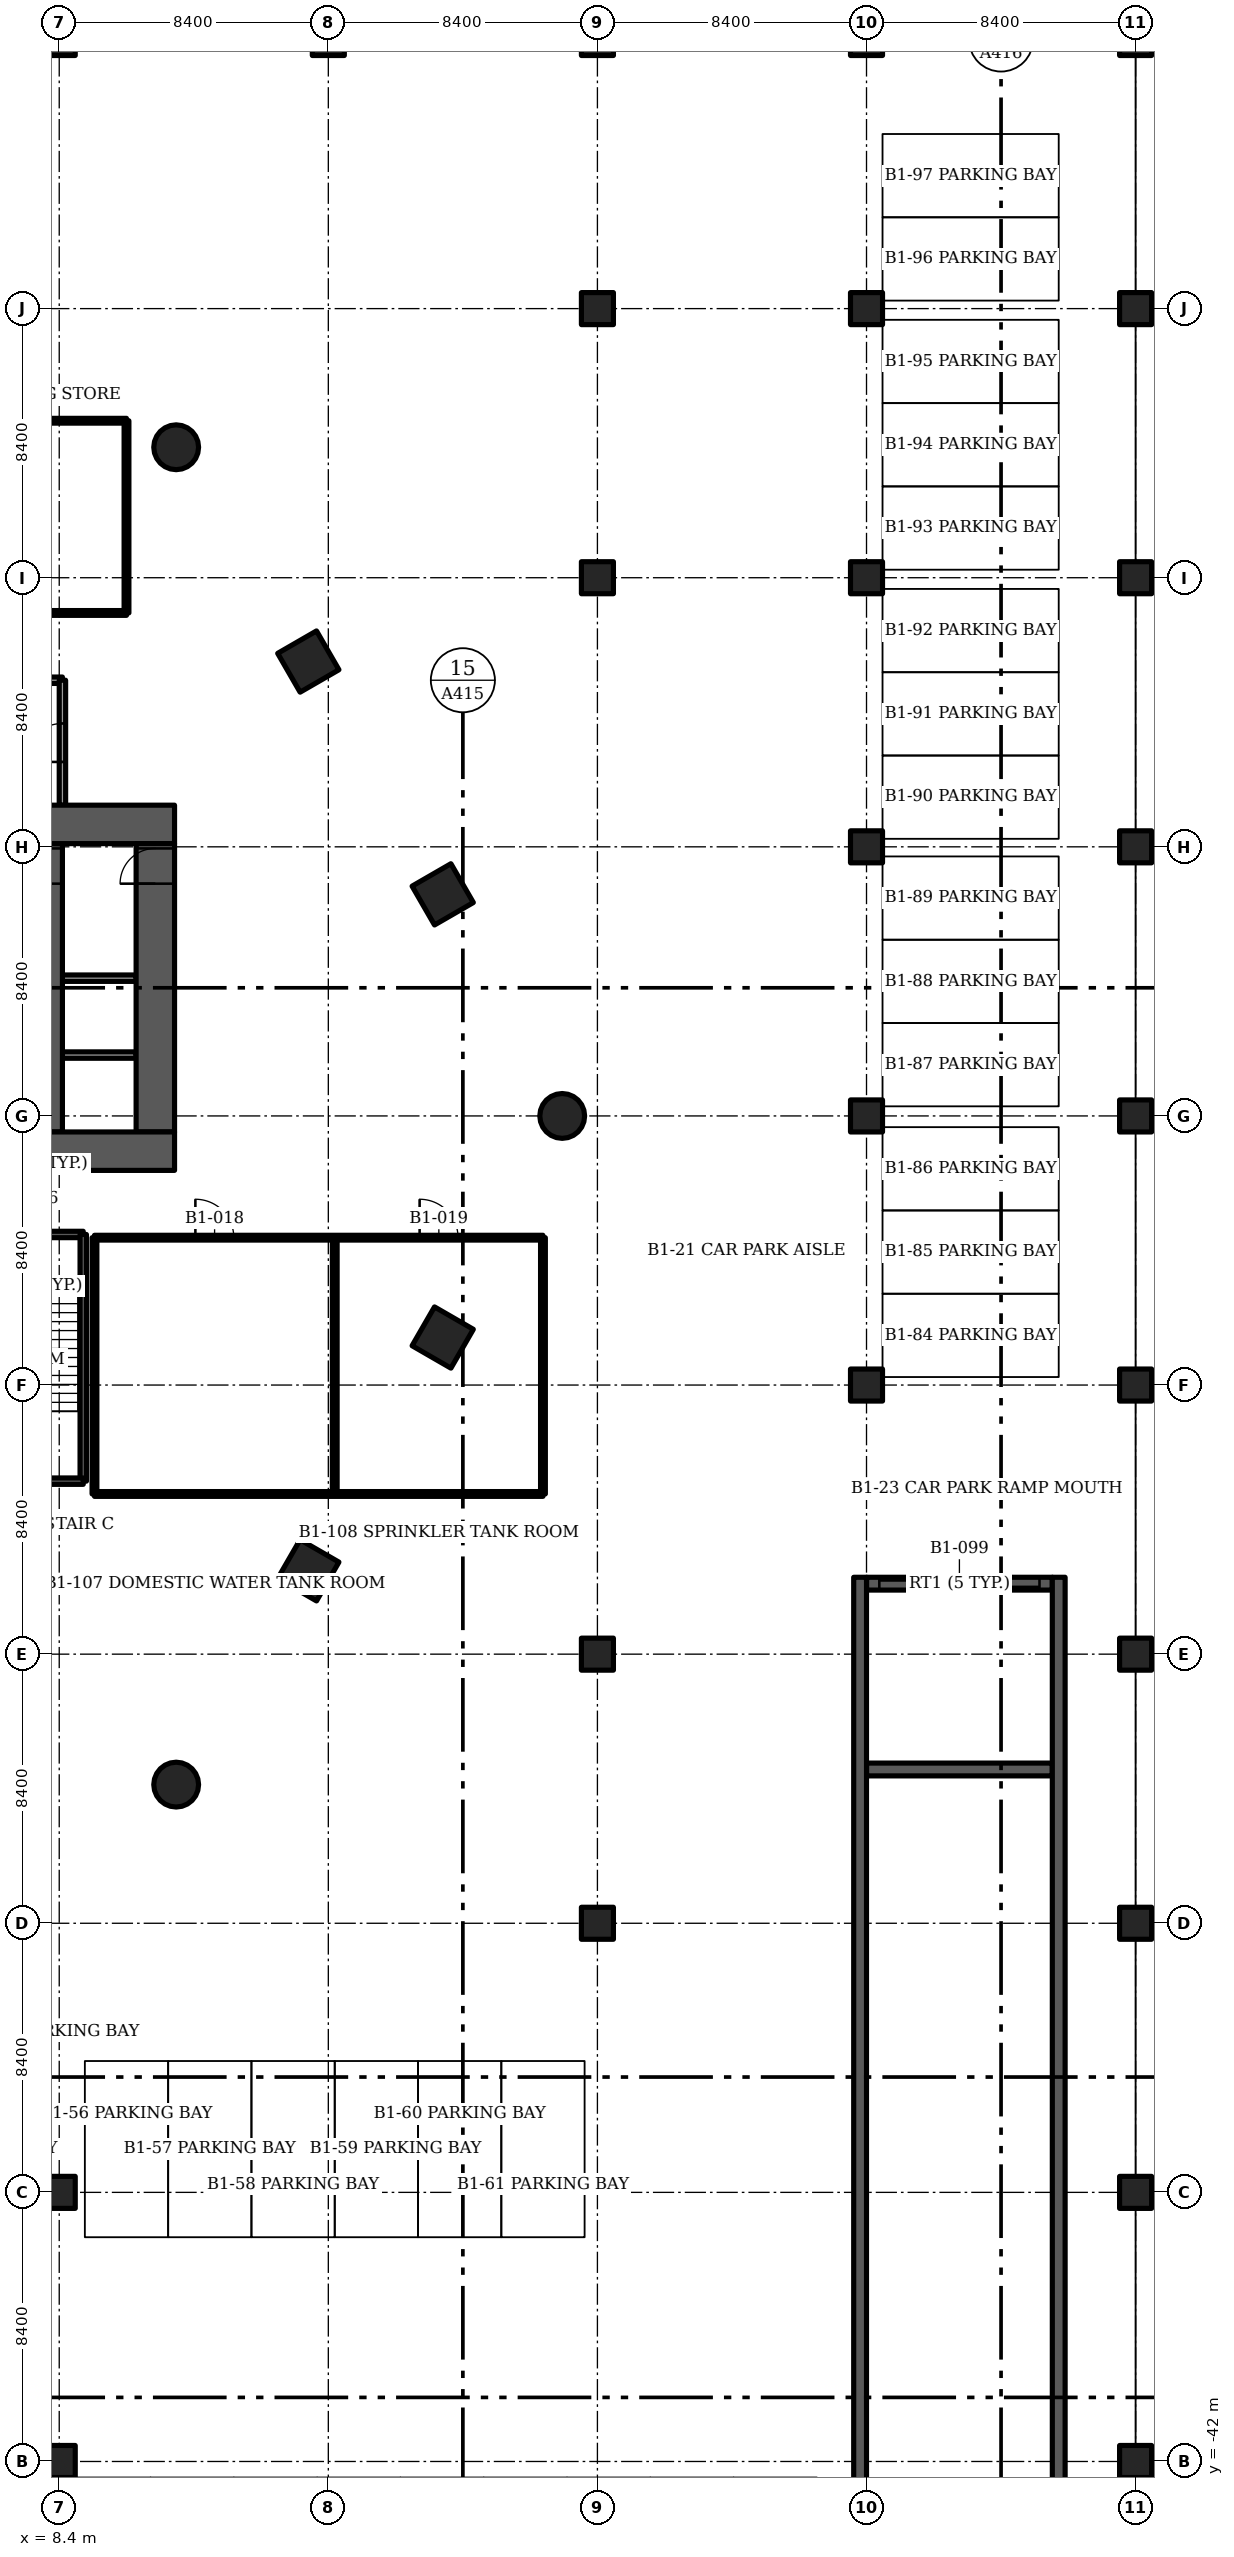
"""IFC4 building model, lengths in metres.
Left out: names, types, materials, properties, quantities, classifications, styles, units other than length and angle.
Written with IfcOpenShell. Run it as: python <this file> out.ifc"""

import sys

from ifc_helpers import new_model, si_unit, direction, frame, frame_2d, origin, origin_2d, place, context, subcontext, project, spatial, rectangle, circle, extrude, element, fill, save


model = new_model("IFC4")
c1 = context("Model", 3, precision=1e-05, world=origin(), true_north=direction((0.0, 1.0)))
c2 = subcontext(c1, "Body", "Model", "MODEL_VIEW")
j1 = project(units=[si_unit("LENGTHUNIT", "METRE"), si_unit("PLANEANGLEUNIT", "RADIAN")], contexts=[c1])
p1 = place(None, origin())
s1 = spatial("IfcSite", under=j1, at=p1, CompositionType="ELEMENT")
p2 = place(p1, origin())
s2 = spatial("IfcBuilding", under=s1, at=p2, CompositionType="ELEMENT")
p3 = place(p2, frame((0.0, 0.0, -5.0)))
s3 = spatial("IfcBuildingStorey", under=s2, at=p3, CompositionType="ELEMENT", Elevation=-5.0)
for number, where, z_axis, x_axis in (
    (1, (8.4, -42.0, -0.3), (0.0, 0.0, 1.0), (1.0, 0.0, 0.0)),
    (2, (8.4, -33.6, -0.3), (0.0, 0.0, 1.0), (1.0, 0.0, 0.0)),
    (3, (8.4, 33.6, -0.3), (0.0, 0.0, 1.0), (1.0, 0.0, 0.0)),
    (4, (16.8, 33.6, -0.3), (0.0, 0.0, 1.0), (1.0, 0.0, 0.0)),
    (5, (25.2, -25.2, -0.3), (0.0, 0.0, 1.0), (1.0, 0.0, 0.0)),
    (6, (25.2, -16.8, -0.3), (0.0, 0.0, 1.0), (1.0, 0.0, 0.0)),
    (7, (25.2, 16.8, -0.3), (0.0, 0.0, 1.0), (1.0, 0.0, 0.0)),
    (8, (25.2, 25.2, -0.3), (0.0, 0.0, 1.0), (1.0, 0.0, 0.0)),
    (9, (25.2, 33.6, -0.3), (0.0, 0.0, 1.0), (1.0, 0.0, 0.0)),
    (10, (33.6, -8.4, -0.3), (0.0, 0.0, 1.0), (1.0, 0.0, 0.0)),
    (11, (33.6, 0.0, -0.3), (0.0, 0.0, 1.0), (1.0, 0.0, 0.0)),
    (12, (33.6, 8.4, -0.3), (0.0, 0.0, 1.0), (1.0, 0.0, 0.0)),
    (13, (33.6, 16.8, -0.3), (0.0, 0.0, 1.0), (1.0, 0.0, 0.0)),
    (14, (33.6, 25.2, -0.3), (0.0, 0.0, 1.0), (1.0, 0.0, 0.0)),
    (15, (33.6, 33.6, -0.3), (0.0, 0.0, 1.0), (1.0, 0.0, 0.0)),
    (16, (42.0, -42.0, -0.3), (0.0, 0.0, 1.0), (1.0, 0.0, 0.0)),
    (17, (42.0, -33.6, -0.3), (0.0, 0.0, 1.0), (1.0, 0.0, 0.0)),
    (18, (42.0, -25.2, -0.3), (0.0, 0.0, 1.0), (1.0, 0.0, 0.0)),
    (19, (42.0, -16.8, -0.3), (0.0, 0.0, 1.0), (1.0, 0.0, 0.0)),
    (20, (42.0, -8.4, -0.3), (0.0, 0.0, 1.0), (1.0, 0.0, 0.0)),
    (21, (42.0, 0.0, -0.3), (0.0, 0.0, 1.0), (1.0, 0.0, 0.0)),
    (22, (42.0, 8.4, -0.3), (0.0, 0.0, 1.0), (1.0, 0.0, 0.0)),
    (23, (42.0, 16.8, -0.3), (0.0, 0.0, 1.0), (1.0, 0.0, 0.0)),
    (24, (42.0, 25.2, -0.3), (0.0, 0.0, 1.0), (1.0, 0.0, 0.0)),
    (25, (42.0, 33.6, -0.3), (0.0, 0.0, 1.0), (1.0, 0.0, 0.0)),
):
    element("IfcColumn", number, at=place(p3, frame(where, z_axis=z_axis, x_axis=x_axis)), inside=s3, PredefinedType="COLUMN", context=c2, shape_type="SweptSolid", body=[
        extrude(rectangle(XDim=1.0, YDim=1.0, at=origin_2d()), origin(), (0.0, 0.0, 1.0), 4.95),
    ])
for number, where, z_axis, x_axis in (
    (26, (12.051, -20.872, 0.0), (0.0, 0.0, 1.0), (1.0, 0.0, 0.0)),
    (27, (24.101, 0.0, 0.0), (0.0, 0.0, 1.0), (1.0, 0.0, 0.0)),
    (28, (12.051, 20.872, 0.0), (0.0, 0.0, 1.0), (1.0, 0.0, 0.0)),
):
    element("IfcColumn", number, at=place(p3, frame(where, z_axis=z_axis, x_axis=x_axis)), inside=s3, PredefinedType="COLUMN", context=c2, shape_type="SweptSolid", body=[
        extrude(circle(Radius=0.7, at=origin_2d()), origin(), (0.0, 0.0, 1.0), 4.65),
    ])
for number, where, z_axis, x_axis in (
    (29, (16.175, -14.183, 0.0), (0.0, 0.0, 1.0), (-0.5, -0.866, 0.0)),
    (30, (20.371, -6.917, 0.0), (0.0, 0.0, 1.0), (-0.5, -0.866, 0.0)),
    (31, (20.371, 6.917, 0.0), (0.0, 0.0, 1.0), (0.5, -0.866, 0.0)),
    (32, (16.175, 14.183, 0.0), (0.0, 0.0, 1.0), (0.5, -0.866, 0.0)),
):
    element("IfcColumn", number, at=place(p3, frame(where, z_axis=z_axis, x_axis=x_axis)), inside=s3, PredefinedType="COLUMN", context=c2, shape_type="SweptSolid", body=[
        extrude(rectangle(XDim=1.4, YDim=1.4, at=origin_2d()), origin(), (0.0, 0.0, 1.0), 4.65),
    ])
p4 = place(p3, frame((-12.0, -1.1, 0.0), z_axis=(0.0, 0.0, 1.0), x_axis=(1.0, 0.0, 0.0)))
e33 = element("IfcWall", 33, at=p4, inside=s3, PredefinedType="SHEAR", context=c2, shape_type="SweptSolid", body=[
    extrude(rectangle(XDim=24.0, YDim=1.2, at=frame_2d((12.0, 0.0))), origin(), (0.0, 0.0, 1.0), 4.65),
])
p5 = place(p4, frame((11.2, 0.0, 0.0)))
e34 = element("IfcOpeningElement", 34, at=p5, cuts=e33, PredefinedType="OPENING", context=c2, shape_type="SweptSolid", body=[
    extrude(rectangle(XDim=1.6, YDim=2.1, at=frame_2d((0.8, 1.05))), frame((0.0, 0.6, 0.0), z_axis=(0.0, -1.0, 0.0), x_axis=(1.0, 0.0, 0.0)), (0.0, 0.0, 1.0), 1.2),
])
p6 = place(p3, frame((-12.0, 9.1, 0.0), z_axis=(0.0, 0.0, 1.0), x_axis=(1.0, 0.0, 0.0)))
e35 = element("IfcWall", 35, at=p6, inside=s3, PredefinedType="SHEAR", context=c2, shape_type="SweptSolid", body=[
    extrude(rectangle(XDim=24.0, YDim=1.2, at=frame_2d((12.0, 0.0))), origin(), (0.0, 0.0, 1.0), 4.65),
])
p7 = place(p6, frame((5.25, 0.0, 0.0)))
e36 = element("IfcOpeningElement", 36, at=p7, cuts=e35, PredefinedType="OPENING", context=c2, shape_type="SweptSolid", body=[
    extrude(rectangle(XDim=1.1, YDim=2.1, at=frame_2d((0.55, 1.05))), frame((0.0, 0.6, 0.0), z_axis=(0.0, -1.0, 0.0), x_axis=(1.0, 0.0, 0.0)), (0.0, 0.0, 1.0), 1.2),
])
p8 = place(p6, frame((17.65, 0.0, 0.0)))
e37 = element("IfcOpeningElement", 37, at=p8, cuts=e35, PredefinedType="OPENING", context=c2, shape_type="SweptSolid", body=[
    extrude(rectangle(XDim=1.1, YDim=2.1, at=frame_2d((0.55, 1.05))), frame((0.0, 0.6, 0.0), z_axis=(0.0, -1.0, 0.0), x_axis=(1.0, 0.0, 0.0)), (0.0, 0.0, 1.0), 1.2),
])
p9 = place(p3, frame((8.1, -0.5, 0.0), z_axis=(0.0, 0.0, 1.0), x_axis=(0.0, 1.0, 0.0)))
e38 = element("IfcWall", 38, at=p9, inside=s3, PredefinedType="SHEAR", context=c2, shape_type="SweptSolid", body=[
    extrude(rectangle(XDim=9.0, YDim=0.8, at=frame_2d((4.5, 0.0))), origin(), (0.0, 0.0, 1.0), 4.65),
])
p10 = place(p9, frame((7.75, 0.0, 0.0)))
e39 = element("IfcOpeningElement", 39, at=p10, cuts=e38, PredefinedType="OPENING", context=c2, shape_type="SweptSolid", body=[
    extrude(rectangle(XDim=1.1, YDim=2.1, at=frame_2d((0.55, 1.05))), frame((0.0, 0.4, 0.0), z_axis=(0.0, -1.0, 0.0), x_axis=(1.0, 0.0, 0.0)), (0.0, 0.0, 1.0), 0.8),
])
p11 = place(p3, frame((11.4, -0.5, 0.0), z_axis=(0.0, 0.0, 1.0), x_axis=(0.0, 1.0, 0.0)))
e40 = element("IfcWall", 40, at=p11, inside=s3, PredefinedType="SHEAR", context=c2, shape_type="SweptSolid", body=[
    extrude(rectangle(XDim=9.0, YDim=1.2, at=frame_2d((4.5, 0.0))), origin(), (0.0, 0.0, 1.0), 4.65),
])
p12 = place(p11, frame((7.75, 0.0, 0.0)))
e41 = element("IfcOpeningElement", 41, at=p12, cuts=e40, PredefinedType="OPENING", context=c2, shape_type="SweptSolid", body=[
    extrude(rectangle(XDim=1.1, YDim=2.1, at=frame_2d((0.55, 1.05))), frame((0.0, 0.6, 0.0), z_axis=(0.0, -1.0, 0.0), x_axis=(1.0, 0.0, 0.0)), (0.0, 0.0, 1.0), 1.2),
])
p13 = place(p3, frame((33.6, -20.4, -0.3), z_axis=(0.0, 0.0, 1.0), x_axis=(1.0, 0.0, 0.0)))
e42 = element("IfcWall", 42, at=p13, inside=s3, PredefinedType="SOLIDWALL", context=c2, shape_type="SweptSolid", body=[
    extrude(rectangle(XDim=5.8, YDim=0.4, at=frame_2d((2.9, 0.0))), origin(), (0.0, 0.0, 1.0), 0.5),
])
p14 = place(p3, frame((33.6, -14.6, 0.0), z_axis=(0.0, 0.0, 1.0), x_axis=(1.0, 0.0, 0.0)))
e43 = element("IfcWall", 43, at=p14, inside=s3, PredefinedType="SOLIDWALL", context=c2, shape_type="SweptSolid", body=[
    extrude(rectangle(XDim=5.8, YDim=0.4, at=frame_2d((2.9, 0.0))), origin(), (0.0, 0.0, 1.0), 2.8),
])
p15 = place(p14, frame((0.4, 0.0, 0.0)))
e44 = element("IfcOpeningElement", 44, at=p15, cuts=e43, PredefinedType="OPENING", context=c2, shape_type="SweptSolid", body=[
    extrude(rectangle(XDim=5.0, YDim=2.4, at=frame_2d((2.5, 1.2))), frame((0.0, 0.2, 0.0), z_axis=(0.0, -1.0, 0.0), x_axis=(1.0, 0.0, 0.0)), (0.0, 0.0, 1.0), 0.4),
])
for number, where, z_axis, x_axis in (
    (45, (33.4, -50.4, 0.0), (0.0, 0.0, 1.0), (0.0, 1.0, 0.0)),
    (46, (39.6, -50.4, 0.0), (0.0, 0.0, 1.0), (0.0, 1.0, 0.0)),
):
    element("IfcWall", number, at=place(p3, frame(where, z_axis=z_axis, x_axis=x_axis)), inside=s3, PredefinedType="SOLIDWALL", context=c2, shape_type="SweptSolid", body=[
        extrude(rectangle(XDim=36.0, YDim=0.4, at=frame_2d((18.0, 0.0))), origin(), (0.0, 0.0, 1.0), 5.0),
    ])
p16 = place(p3, frame((5.8, -3.7, 0.0), z_axis=(0.0, 0.0, 1.0), x_axis=(1.0, 0.0, 0.0)))
e47 = element("IfcWall", 47, at=p16, inside=s3, PredefinedType="SOLIDWALL", context=c2, shape_type="SweptSolid", body=[
    extrude(rectangle(XDim=3.35, YDim=0.2, at=frame_2d((1.675, 0.0))), origin(), (0.0, 0.0, 1.0), 4.65),
])
p17 = place(p16, frame((1.125, 0.0, 0.0)))
e48 = element("IfcOpeningElement", 48, at=p17, cuts=e47, PredefinedType="OPENING", context=c2, shape_type="SweptSolid", body=[
    extrude(rectangle(XDim=1.1, YDim=2.1, at=frame_2d((0.55, 1.05))), frame((0.0, 0.1, 0.0), z_axis=(0.0, -1.0, 0.0), x_axis=(1.0, 0.0, 0.0)), (0.0, 0.0, 1.0), 0.2),
])
p18 = place(p3, frame((9.15, -3.7, 0.0), z_axis=(0.0, 0.0, 1.0), x_axis=(0.0, -1.0, 0.0)))
e49 = element("IfcWall", 49, at=p18, inside=s3, PredefinedType="SOLIDWALL", context=c2, shape_type="SweptSolid", body=[
    extrude(rectangle(XDim=7.7, YDim=0.2, at=frame_2d((3.85, 0.0))), origin(), (0.0, 0.0, 1.0), 4.65),
])
p19 = place(p3, frame((5.8, -11.4, 0.0), z_axis=(0.0, 0.0, 1.0), x_axis=(1.0, 0.0, 0.0)))
e50 = element("IfcWall", 50, at=p19, inside=s3, PredefinedType="SOLIDWALL", context=c2, shape_type="SweptSolid", body=[
    extrude(rectangle(XDim=3.35, YDim=0.2, at=frame_2d((1.675, 0.0))), origin(), (0.0, 0.0, 1.0), 4.65),
])
p20 = place(p3, frame((-8.5, 13.6, 0.0), z_axis=(0.0, 0.0, 1.0), x_axis=(1.0, 0.0, 0.0)))
e51 = element("IfcWall", 51, at=p20, inside=s3, PredefinedType="PARTITIONING", context=c2, shape_type="SweptSolid", body=[
    extrude(rectangle(XDim=17.0, YDim=0.2, at=frame_2d((8.5, 0.0))), origin(), (0.0, 0.0, 1.0), 4.65),
])
p21 = place(p3, frame((8.5, 9.7, 0.0), z_axis=(0.0, 0.0, 1.0), x_axis=(0.0, 1.0, 0.0)))
e52 = element("IfcWall", 52, at=p21, inside=s3, PredefinedType="PARTITIONING", context=c2, shape_type="SweptSolid", body=[
    extrude(rectangle(XDim=3.9, YDim=0.2, at=frame_2d((1.95, 0.0))), origin(), (0.0, 0.0, 1.0), 4.65),
])
p22 = place(p21, frame((1.35, 0.0, 0.0)))
e53 = element("IfcOpeningElement", 53, at=p22, cuts=e52, PredefinedType="OPENING", context=c2, shape_type="SweptSolid", body=[
    extrude(rectangle(XDim=1.2, YDim=2.1, at=frame_2d((0.6, 1.05))), frame((0.0, 0.1, 0.0), z_axis=(0.0, -1.0, 0.0), x_axis=(1.0, 0.0, 0.0)), (0.0, 0.0, 1.0), 0.2),
])
for number, where, z_axis, x_axis in (
    (54, (8.5, 1.9, 0.0), (0.0, 0.0, 1.0), (1.0, 0.0, 0.0)),
    (55, (8.5, 4.3, 0.0), (0.0, 0.0, 1.0), (1.0, 0.0, 0.0)),
):
    element("IfcWall", number, at=place(p3, frame(where, z_axis=z_axis, x_axis=x_axis)), inside=s3, PredefinedType="PARTITIONING", context=c2, shape_type="SweptSolid", body=[
        extrude(rectangle(XDim=2.3, YDim=0.2, at=frame_2d((1.15, 0.0))), origin(), (0.0, 0.0, 1.0), 4.65),
    ])
p23 = place(p3, frame((9.5, -3.8, 0.0), z_axis=(0.0, 0.0, 1.0), x_axis=(1.0, 0.0, 0.0)))
e56 = element("IfcWall", 56, at=p23, inside=s3, PredefinedType="PARTITIONING", context=c2, shape_type="SweptSolid", body=[
    extrude(rectangle(XDim=14.0, YDim=0.15, at=frame_2d((7.0, 0.0))), origin(), (0.0, 0.0, 1.0), 4.65),
])
p24 = place(p23, frame((3.15, 0.0, 0.0)))
e57 = element("IfcOpeningElement", 57, at=p24, cuts=e56, PredefinedType="OPENING", context=c2, shape_type="SweptSolid", body=[
    extrude(rectangle(XDim=1.2, YDim=2.1, at=frame_2d((0.6, 1.05))), frame((0.0, 0.075, 0.0), z_axis=(0.0, -1.0, 0.0), x_axis=(1.0, 0.0, 0.0)), (0.0, 0.0, 1.0), 0.15),
])
p25 = place(p23, frame((10.15, 0.0, 0.0)))
e58 = element("IfcOpeningElement", 58, at=p25, cuts=e56, PredefinedType="OPENING", context=c2, shape_type="SweptSolid", body=[
    extrude(rectangle(XDim=1.2, YDim=2.1, at=frame_2d((0.6, 1.05))), frame((0.0, 0.075, 0.0), z_axis=(0.0, -1.0, 0.0), x_axis=(1.0, 0.0, 0.0)), (0.0, 0.0, 1.0), 0.15),
])
p26 = place(p3, frame((9.5, -11.8, 0.0), z_axis=(0.0, 0.0, 1.0), x_axis=(1.0, 0.0, 0.0)))
e59 = element("IfcWall", 59, at=p26, inside=s3, PredefinedType="PARTITIONING", context=c2, shape_type="SweptSolid", body=[
    extrude(rectangle(XDim=14.0, YDim=0.15, at=frame_2d((7.0, 0.0))), origin(), (0.0, 0.0, 1.0), 4.65),
])
for number, where, z_axis, x_axis in (
    (60, (9.5, -3.8, 0.0), (0.0, 0.0, 1.0), (0.0, -1.0, 0.0)),
    (61, (17.0, -3.8, 0.0), (0.0, 0.0, 1.0), (0.0, -1.0, 0.0)),
    (62, (23.5, -3.8, 0.0), (0.0, 0.0, 1.0), (0.0, -1.0, 0.0)),
):
    element("IfcWall", number, at=place(p3, frame(where, z_axis=z_axis, x_axis=x_axis)), inside=s3, PredefinedType="PARTITIONING", context=c2, shape_type="SweptSolid", body=[
        extrude(rectangle(XDim=8.0, YDim=0.15, at=frame_2d((4.0, 0.0))), origin(), (0.0, 0.0, 1.0), 4.65),
    ])
p27 = place(p3, frame((-10.5, 15.7, 0.0), z_axis=(0.0, 0.0, 1.0), x_axis=(1.0, 0.0, 0.0)))
e63 = element("IfcWall", 63, at=p27, inside=s3, PredefinedType="PARTITIONING", context=c2, shape_type="SweptSolid", body=[
    extrude(rectangle(XDim=21.0, YDim=0.15, at=frame_2d((10.5, 0.0))), origin(), (0.0, 0.0, 1.0), 4.65),
])
p28 = place(p27, frame((2.9, 0.0, 0.0)))
e64 = element("IfcOpeningElement", 64, at=p28, cuts=e63, PredefinedType="OPENING", context=c2, shape_type="SweptSolid", body=[
    extrude(rectangle(XDim=1.2, YDim=2.1, at=frame_2d((0.6, 1.05))), frame((0.0, 0.075, 0.0), z_axis=(0.0, -1.0, 0.0), x_axis=(1.0, 0.0, 0.0)), (0.0, 0.0, 1.0), 0.15),
])
p29 = place(p27, frame((9.65, 0.0, 0.0)))
e65 = element("IfcOpeningElement", 65, at=p29, cuts=e63, PredefinedType="OPENING", context=c2, shape_type="SweptSolid", body=[
    extrude(rectangle(XDim=1.2, YDim=2.1, at=frame_2d((0.6, 1.05))), frame((0.0, 0.075, 0.0), z_axis=(0.0, -1.0, 0.0), x_axis=(1.0, 0.0, 0.0)), (0.0, 0.0, 1.0), 0.15),
])
p30 = place(p27, frame((16.65, 0.0, 0.0)))
e66 = element("IfcOpeningElement", 66, at=p30, cuts=e63, PredefinedType="OPENING", context=c2, shape_type="SweptSolid", body=[
    extrude(rectangle(XDim=1.2, YDim=2.1, at=frame_2d((0.6, 1.05))), frame((0.0, 0.075, 0.0), z_axis=(0.0, -1.0, 0.0), x_axis=(1.0, 0.0, 0.0)), (0.0, 0.0, 1.0), 0.15),
])
p31 = place(p3, frame((-10.5, 21.7, 0.0), z_axis=(0.0, 0.0, 1.0), x_axis=(1.0, 0.0, 0.0)))
e67 = element("IfcWall", 67, at=p31, inside=s3, PredefinedType="PARTITIONING", context=c2, shape_type="SweptSolid", body=[
    extrude(rectangle(XDim=21.0, YDim=0.15, at=frame_2d((10.5, 0.0))), origin(), (0.0, 0.0, 1.0), 4.65),
])
p32 = place(p3, frame((10.5, 15.7, 0.0), z_axis=(0.0, 0.0, 1.0), x_axis=(0.0, 1.0, 0.0)))
e68 = element("IfcWall", 68, at=p32, inside=s3, PredefinedType="PARTITIONING", context=c2, shape_type="SweptSolid", body=[
    extrude(rectangle(XDim=6.0, YDim=0.15, at=frame_2d((3.0, 0.0))), origin(), (0.0, 0.0, 1.0), 4.65),
])
p33 = place(p22, origin())
e69 = element("IfcDoor", 69, at=p33, inside=s3, OperationType="SINGLE_SWING_LEFT", PredefinedType="DOOR", context=c2, shape_type="SweptSolid", body=[
    extrude(rectangle(XDim=1.2, YDim=2.1, at=frame_2d((0.6, 1.05))), frame((0.0, 0.025, 0.0), z_axis=(0.0, -1.0, 0.0), x_axis=(1.0, 0.0, 0.0)), (0.0, 0.0, 1.0), 0.05),
])
fill(e53, e69)
p34 = place(p12, origin())
e70 = element("IfcDoor", 70, at=p34, inside=s3, OperationType="SINGLE_SWING_RIGHT", PredefinedType="DOOR", context=c2, shape_type="SweptSolid", body=[
    extrude(rectangle(XDim=1.1, YDim=2.1, at=frame_2d((0.55, 1.05))), frame((0.0, 0.025, 0.0), z_axis=(0.0, -1.0, 0.0), x_axis=(1.0, 0.0, 0.0)), (0.0, 0.0, 1.0), 0.05),
])
fill(e41, e70)
p35 = place(p15, origin())
e71 = element("IfcDoor", 71, at=p35, inside=s3, OperationType="SLIDING_TO_LEFT", PredefinedType="DOOR", context=c2, shape_type="SweptSolid", body=[
    extrude(rectangle(XDim=5.0, YDim=2.4, at=frame_2d((2.5, 1.2))), frame((0.0, 0.025, 0.0), z_axis=(0.0, -1.0, 0.0), x_axis=(1.0, 0.0, 0.0)), (0.0, 0.0, 1.0), 0.05),
])
fill(e44, e71)
p36 = place(p24, origin())
e72 = element("IfcDoor", 72, at=p36, inside=s3, OperationType="SINGLE_SWING_LEFT", PredefinedType="DOOR", context=c2, shape_type="SweptSolid", body=[
    extrude(rectangle(XDim=1.2, YDim=2.1, at=frame_2d((0.6, 1.05))), frame((0.0, 0.025, 0.0), z_axis=(0.0, -1.0, 0.0), x_axis=(1.0, 0.0, 0.0)), (0.0, 0.0, 1.0), 0.05),
])
fill(e57, e72)
p37 = place(p25, origin())
e73 = element("IfcDoor", 73, at=p37, inside=s3, OperationType="SINGLE_SWING_LEFT", PredefinedType="DOOR", context=c2, shape_type="SweptSolid", body=[
    extrude(rectangle(XDim=1.2, YDim=2.1, at=frame_2d((0.6, 1.05))), frame((0.0, 0.025, 0.0), z_axis=(0.0, -1.0, 0.0), x_axis=(1.0, 0.0, 0.0)), (0.0, 0.0, 1.0), 0.05),
])
fill(e58, e73)
save(model, sys.argv[1])
